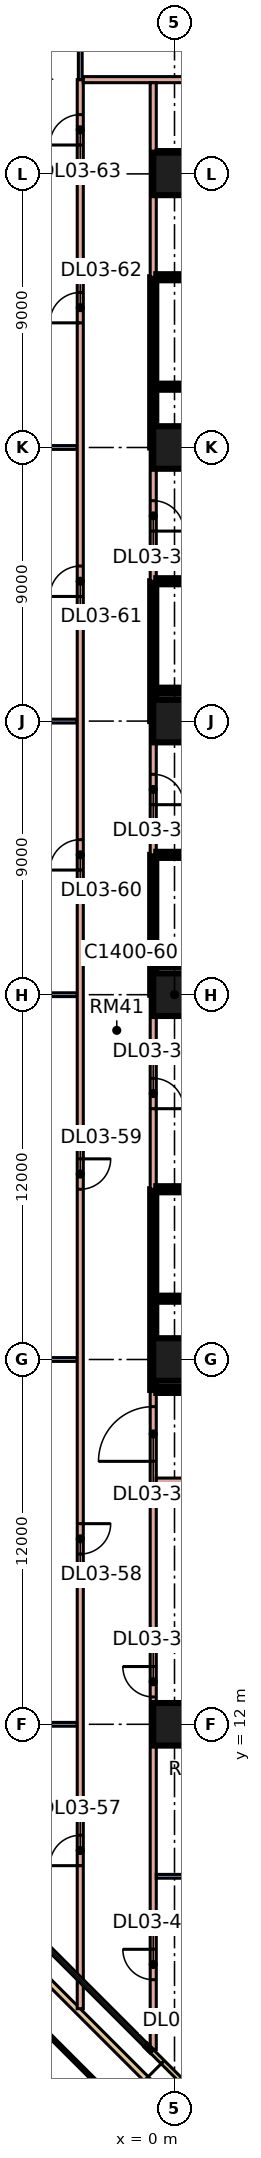
"""IFC4 building model, lengths in metres.
Left out: names, types, materials, properties, quantities, classifications, styles, units other than length and angle.
Written with IfcOpenShell. Run it as: python <this file> out.ifc"""

import sys

from ifc_helpers import new_model, si_unit, direction, frame, frame_2d, origin, origin_2d, place, context, subcontext, project, spatial, rectangle, extrude, element, fill, save


model = new_model("IFC4")
c1 = context("Model", 3, precision=1e-05, world=origin(), true_north=direction((0.0, 1.0)))
c2 = subcontext(c1, "Body", "Model", "MODEL_VIEW")
j1 = project(units=[si_unit("LENGTHUNIT", "METRE"), si_unit("PLANEANGLEUNIT", "RADIAN")], contexts=[c1])
p1 = place(None, origin())
s1 = spatial("IfcSite", under=j1, at=p1, CompositionType="ELEMENT")
p2 = place(p1, origin())
s2 = spatial("IfcBuilding", under=s1, at=p2, CompositionType="ELEMENT")
p3 = place(p2, frame((0.0, 0.0, 16.8)))
s3 = spatial("IfcBuildingStorey", under=s2, at=p3, CompositionType="ELEMENT", Elevation=16.8)
for number, where, z_axis, x_axis in (
    (1, (0.0, 12.0, 0.0), (0.0, 0.0, 1.0), (1.0, 0.0, 0.0)),
    (2, (0.0, 24.0, 0.0), (0.0, 0.0, 1.0), (1.0, 0.0, 0.0)),
    (3, (0.0, 36.0, 0.0), (0.0, 0.0, 1.0), (1.0, 0.0, 0.0)),
    (4, (0.0, 45.0, 0.0), (0.0, 0.0, 1.0), (1.0, 0.0, 0.0)),
    (5, (0.0, 54.0, 0.0), (0.0, 0.0, 1.0), (1.0, 0.0, 0.0)),
    (6, (0.0, 63.0, 0.0), (0.0, 0.0, 1.0), (1.0, 0.0, 0.0)),
):
    element("IfcColumn", number, at=place(p3, frame(where, z_axis=z_axis, x_axis=x_axis)), inside=s3, PredefinedType="COLUMN", context=c2, shape_type="SweptSolid", body=[
        extrude(rectangle(XDim=1.4, YDim=1.4, at=origin_2d()), origin(), (0.0, 0.0, 1.0), 4.8),
    ])
p4 = place(p3, frame((-0.811, 1.31, 0.0), z_axis=(0.0, 0.0, 1.0), x_axis=(0.707106781187, -0.707106781187, 0.0)))
e7 = element("IfcWall", 7, at=p4, inside=s3, PredefinedType="SOLIDWALL", context=c2, shape_type="SweptSolid", body=[
    extrude(rectangle(XDim=3.0, YDim=0.15, at=frame_2d((1.5, 0.0))), origin(), (0.0, 0.0, 1.0), 4.4),
])
p5 = place(p4, frame((0.6, 0.0, 0.0)))
e8 = element("IfcOpeningElement", 8, at=p5, cuts=e7, PredefinedType="OPENING", context=c2, shape_type="SweptSolid", body=[
    extrude(rectangle(XDim=1.8, YDim=2.4, at=frame_2d((0.9, 1.2))), frame((0.0, 0.085, 0.0), z_axis=(0.0, -1.0, 0.0), x_axis=(1.0, 0.0, 0.0)), (0.0, 0.0, 1.0), 0.17),
])
p6 = place(p3, frame((9.104, -9.7, 0.0), z_axis=(0.0, 0.0, 1.0), x_axis=(-0.707106781187, 0.707106781187, 0.0)))
e9 = element("IfcWall", 9, at=p6, inside=s3, PredefinedType="PARAPET", context=c2, shape_type="SweptSolid", body=[
    extrude(rectangle(XDim=26.592, YDim=0.2, at=frame_2d((13.296, 0.0))), origin(), (0.0, 0.0, 1.0), 0.5),
])
p7 = place(p3, frame((-9.7, 64.896, 0.0), z_axis=(0.0, 0.0, 1.0), x_axis=(0.707106781187, 0.707106781187, 0.0)))
e10 = element("IfcWall", 10, at=p7, inside=s3, PredefinedType="PARAPET", context=c2, shape_type="SweptSolid", body=[
    extrude(rectangle(XDim=11.036, YDim=0.2, at=frame_2d((5.518, 0.0))), origin(), (0.0, 0.0, 1.0), 0.5),
])
for number, where, z_axis, x_axis in (
    (11, (-9.6, 12.0, 0.0), (0.0, 0.0, 1.0), (1.0, 0.0, 0.0)),
    (12, (-9.6, 45.0, 0.0), (0.0, 0.0, 1.0), (1.0, 0.0, 0.0)),
    (13, (-9.6, 54.0, 0.0), (0.0, 0.0, 1.0), (1.0, 0.0, 0.0)),
    (14, (-9.6, 63.0, 0.0), (0.0, 0.0, 1.0), (1.0, 0.0, 0.0)),
):
    element("IfcWall", number, at=place(p3, frame(where, z_axis=z_axis, x_axis=x_axis)), inside=s3, PredefinedType="PARTITIONING", context=c2, shape_type="SweptSolid", body=[
        extrude(rectangle(XDim=6.4, YDim=0.125, at=frame_2d((3.2, 0.0))), origin(), (0.0, 0.0, 1.0), 4.4),
    ])
for number, where, z_axis, x_axis in (
    (15, (-8.851, 24.0, 0.0), (0.0, 0.0, 1.0), (1.0, 0.0, 0.0)),
    (16, (-8.851, 36.0, 0.0), (0.0, 0.0, 1.0), (1.0, 0.0, 0.0)),
):
    element("IfcWall", number, at=place(p3, frame(where, z_axis=z_axis, x_axis=x_axis)), inside=s3, PredefinedType="PARTITIONING", context=c2, shape_type="SweptSolid", body=[
        extrude(rectangle(XDim=5.651, YDim=0.125, at=frame_2d((2.826, 0.0))), origin(), (0.0, 0.0, 1.0), 4.4),
    ])
p8 = place(p3, frame((-3.1, 2.645, 0.0), z_axis=(0.0, 0.0, 1.0), x_axis=(0.0, 1.0, 0.0)))
e17 = element("IfcWall", 17, at=p8, inside=s3, PredefinedType="PARTITIONING", context=c2, shape_type="SweptSolid", body=[
    extrude(rectangle(XDim=63.455, YDim=0.2, at=frame_2d((31.728, 0.0))), origin(), (0.0, 0.0, 1.0), 4.4),
])
p9 = place(p8, frame((4.705, 0.0, 0.0)))
e18 = element("IfcOpeningElement", 18, at=p9, cuts=e17, PredefinedType="OPENING", context=c2, shape_type="SweptSolid", body=[
    extrude(rectangle(XDim=1.0, YDim=2.1, at=frame_2d((0.5, 1.05))), frame((0.0, 0.11, 0.0), z_axis=(0.0, -1.0, 0.0), x_axis=(1.0, 0.0, 0.0)), (0.0, 0.0, 1.0), 0.22),
])
p10 = place(p8, frame((14.955, 0.0, 0.0)))
e19 = element("IfcOpeningElement", 19, at=p10, cuts=e17, PredefinedType="OPENING", context=c2, shape_type="SweptSolid", body=[
    extrude(rectangle(XDim=1.0, YDim=2.1, at=frame_2d((0.5, 1.05))), frame((0.0, 0.11, 0.0), z_axis=(0.0, -1.0, 0.0), x_axis=(1.0, 0.0, 0.0)), (0.0, 0.0, 1.0), 0.22),
])
p11 = place(p8, frame((26.955, 0.0, 0.0)))
e20 = element("IfcOpeningElement", 20, at=p11, cuts=e17, PredefinedType="OPENING", context=c2, shape_type="SweptSolid", body=[
    extrude(rectangle(XDim=1.0, YDim=2.1, at=frame_2d((0.5, 1.05))), frame((0.0, 0.11, 0.0), z_axis=(0.0, -1.0, 0.0), x_axis=(1.0, 0.0, 0.0)), (0.0, 0.0, 1.0), 0.22),
])
p12 = place(p8, frame((37.455, 0.0, 0.0)))
e21 = element("IfcOpeningElement", 21, at=p12, cuts=e17, PredefinedType="OPENING", context=c2, shape_type="SweptSolid", body=[
    extrude(rectangle(XDim=1.0, YDim=2.1, at=frame_2d((0.5, 1.05))), frame((0.0, 0.11, 0.0), z_axis=(0.0, -1.0, 0.0), x_axis=(1.0, 0.0, 0.0)), (0.0, 0.0, 1.0), 0.22),
])
p13 = place(p8, frame((46.455, 0.0, 0.0)))
e22 = element("IfcOpeningElement", 22, at=p13, cuts=e17, PredefinedType="OPENING", context=c2, shape_type="SweptSolid", body=[
    extrude(rectangle(XDim=1.0, YDim=2.1, at=frame_2d((0.5, 1.05))), frame((0.0, 0.11, 0.0), z_axis=(0.0, -1.0, 0.0), x_axis=(1.0, 0.0, 0.0)), (0.0, 0.0, 1.0), 0.22),
])
p14 = place(p8, frame((55.455, 0.0, 0.0)))
e23 = element("IfcOpeningElement", 23, at=p14, cuts=e17, PredefinedType="OPENING", context=c2, shape_type="SweptSolid", body=[
    extrude(rectangle(XDim=1.0, YDim=2.1, at=frame_2d((0.5, 1.05))), frame((0.0, 0.11, 0.0), z_axis=(0.0, -1.0, 0.0), x_axis=(1.0, 0.0, 0.0)), (0.0, 0.0, 1.0), 0.22),
])
p15 = place(p8, frame((61.305, 0.0, 0.0)))
e24 = element("IfcOpeningElement", 24, at=p15, cuts=e17, PredefinedType="OPENING", context=c2, shape_type="SweptSolid", body=[
    extrude(rectangle(XDim=1.0, YDim=2.1, at=frame_2d((0.5, 1.05))), frame((0.0, 0.11, 0.0), z_axis=(0.0, -1.0, 0.0), x_axis=(1.0, 0.0, 0.0)), (0.0, 0.0, 1.0), 0.22),
])
p16 = place(p3, frame((-3.1, 66.1, 0.0), z_axis=(0.0, 0.0, 1.0), x_axis=(0.0, 1.0, 0.0)))
e25 = element("IfcWall", 25, at=p16, inside=s3, PredefinedType="PARTITIONING", context=c2, shape_type="SweptSolid", body=[
    extrude(rectangle(XDim=5.255, YDim=0.125, at=frame_2d((2.627, 0.0))), origin(), (0.0, 0.0, 1.0), 4.4),
])
p17 = place(p3, frame((-3.0, 66.1, 0.0), z_axis=(0.0, 0.0, 1.0), x_axis=(1.0, 0.0, 0.0)))
e26 = element("IfcWall", 26, at=p17, inside=s3, PredefinedType="PARTITIONING", context=c2, shape_type="SweptSolid", body=[
    extrude(rectangle(XDim=30.0, YDim=0.2, at=frame_2d((15.0, 0.0))), origin(), (0.0, 0.0, 1.0), 4.4),
])
p18 = place(p17, frame((8.6, 0.0, 0.0)))
e27 = element("IfcOpeningElement", 27, at=p18, cuts=e26, PredefinedType="OPENING", context=c2, shape_type="SweptSolid", body=[
    extrude(rectangle(XDim=1.0, YDim=2.1, at=frame_2d((0.5, 1.05))), frame((0.0, 0.11, 0.0), z_axis=(0.0, -1.0, 0.0), x_axis=(1.0, 0.0, 0.0)), (0.0, 0.0, 1.0), 0.22),
])
p19 = place(p17, frame((22.35, 0.0, 0.0)))
e28 = element("IfcOpeningElement", 28, at=p19, cuts=e26, PredefinedType="OPENING", context=c2, shape_type="SweptSolid", body=[
    extrude(rectangle(XDim=1.0, YDim=2.1, at=frame_2d((0.5, 1.05))), frame((0.0, 0.11, 0.0), z_axis=(0.0, -1.0, 0.0), x_axis=(1.0, 0.0, 0.0)), (0.0, 0.0, 1.0), 0.22),
])
p20 = place(p3, frame((-0.7, 1.304, 0.0), z_axis=(0.0, 0.0, 1.0), x_axis=(0.0, 1.0, 0.0)))
e29 = element("IfcWall", 29, at=p20, inside=s3, PredefinedType="PARTITIONING", context=c2, shape_type="SweptSolid", body=[
    extrude(rectangle(XDim=21.696, YDim=0.2, at=frame_2d((10.848, 0.0))), origin(), (0.0, 0.0, 1.0), 4.4),
])
p21 = place(p20, frame((19.346, 0.0, 0.0)))
e30 = element("IfcOpeningElement", 30, at=p21, cuts=e29, PredefinedType="OPENING", context=c2, shape_type="SweptSolid", body=[
    extrude(rectangle(XDim=1.8, YDim=2.1, at=frame_2d((0.9, 1.05))), frame((0.0, 0.11, 0.0), z_axis=(0.0, -1.0, 0.0), x_axis=(1.0, 0.0, 0.0)), (0.0, 0.0, 1.0), 0.22),
])
p22 = place(p20, frame((11.596, 0.0, 0.0)))
e31 = element("IfcOpeningElement", 31, at=p22, cuts=e29, PredefinedType="OPENING", context=c2, shape_type="SweptSolid", body=[
    extrude(rectangle(XDim=1.0, YDim=2.1, at=frame_2d((0.5, 1.05))), frame((0.0, 0.11, 0.0), z_axis=(0.0, -1.0, 0.0), x_axis=(1.0, 0.0, 0.0)), (0.0, 0.0, 1.0), 0.22),
])
p23 = place(p20, frame((2.295, 0.0, 0.0)))
e32 = element("IfcOpeningElement", 32, at=p23, cuts=e29, PredefinedType="OPENING", context=c2, shape_type="SweptSolid", body=[
    extrude(rectangle(XDim=1.0, YDim=2.1, at=frame_2d((0.5, 1.05))), frame((0.0, 0.11, 0.0), z_axis=(0.0, -1.0, 0.0), x_axis=(1.0, 0.0, 0.0)), (0.0, 0.0, 1.0), 0.22),
])
p24 = place(p3, frame((-0.7, 23.0, 0.0), z_axis=(0.0, 0.0, 1.0), x_axis=(0.0, 1.0, 0.0)))
e33 = element("IfcWall", 33, at=p24, inside=s3, PredefinedType="SOLIDWALL", context=c2, shape_type="SweptSolid", body=[
    extrude(rectangle(XDim=6.6, YDim=0.2, at=frame_2d((3.3, 0.0))), origin(), (0.0, 0.0, 1.0), 4.4),
])
p25 = place(p3, frame((-0.7, 29.6, 0.0), z_axis=(0.0, 0.0, 1.0), x_axis=(0.0, 1.0, 0.0)))
e34 = element("IfcWall", 34, at=p25, inside=s3, PredefinedType="PARTITIONING", context=c2, shape_type="SweptSolid", body=[
    extrude(rectangle(XDim=6.4, YDim=0.2, at=frame_2d((3.2, 0.0))), origin(), (0.0, 0.0, 1.0), 4.4),
])
p26 = place(p25, frame((2.65, 0.0, 0.0)))
e35 = element("IfcOpeningElement", 35, at=p26, cuts=e34, PredefinedType="OPENING", context=c2, shape_type="SweptSolid", body=[
    extrude(rectangle(XDim=1.0, YDim=2.1, at=frame_2d((0.5, 1.05))), frame((0.0, 0.11, 0.0), z_axis=(0.0, -1.0, 0.0), x_axis=(1.0, 0.0, 0.0)), (0.0, 0.0, 1.0), 0.22),
])
p27 = place(p3, frame((-0.7, 36.0, 0.0), z_axis=(0.0, 0.0, 1.0), x_axis=(0.0, 1.0, 0.0)))
e36 = element("IfcWall", 36, at=p27, inside=s3, PredefinedType="SOLIDWALL", context=c2, shape_type="SweptSolid", body=[
    extrude(rectangle(XDim=4.6, YDim=0.2, at=frame_2d((2.3, 0.0))), origin(), (0.0, 0.0, 1.0), 4.4),
])
p28 = place(p3, frame((-0.7, 40.6, 0.0), z_axis=(0.0, 0.0, 1.0), x_axis=(0.0, 1.0, 0.0)))
e37 = element("IfcWall", 37, at=p28, inside=s3, PredefinedType="PARTITIONING", context=c2, shape_type="SweptSolid", body=[
    extrude(rectangle(XDim=4.4, YDim=0.2, at=frame_2d((2.2, 0.0))), origin(), (0.0, 0.0, 1.0), 4.4),
])
p29 = place(p28, frame((1.65, 0.0, 0.0)))
e38 = element("IfcOpeningElement", 38, at=p29, cuts=e37, PredefinedType="OPENING", context=c2, shape_type="SweptSolid", body=[
    extrude(rectangle(XDim=1.0, YDim=2.1, at=frame_2d((0.5, 1.05))), frame((0.0, 0.11, 0.0), z_axis=(0.0, -1.0, 0.0), x_axis=(1.0, 0.0, 0.0)), (0.0, 0.0, 1.0), 0.22),
])
p30 = place(p3, frame((-0.7, 45.0, 0.0), z_axis=(0.0, 0.0, 1.0), x_axis=(0.0, 1.0, 0.0)))
e39 = element("IfcWall", 39, at=p30, inside=s3, PredefinedType="SOLIDWALL", context=c2, shape_type="SweptSolid", body=[
    extrude(rectangle(XDim=4.6, YDim=0.2, at=frame_2d((2.3, 0.0))), origin(), (0.0, 0.0, 1.0), 4.4),
])
p31 = place(p3, frame((-0.7, 49.6, 0.0), z_axis=(0.0, 0.0, 1.0), x_axis=(0.0, 1.0, 0.0)))
e40 = element("IfcWall", 40, at=p31, inside=s3, PredefinedType="PARTITIONING", context=c2, shape_type="SweptSolid", body=[
    extrude(rectangle(XDim=4.4, YDim=0.2, at=frame_2d((2.2, 0.0))), origin(), (0.0, 0.0, 1.0), 4.4),
])
p32 = place(p31, frame((1.65, 0.0, 0.0)))
e41 = element("IfcOpeningElement", 41, at=p32, cuts=e40, PredefinedType="OPENING", context=c2, shape_type="SweptSolid", body=[
    extrude(rectangle(XDim=1.0, YDim=2.1, at=frame_2d((0.5, 1.05))), frame((0.0, 0.11, 0.0), z_axis=(0.0, -1.0, 0.0), x_axis=(1.0, 0.0, 0.0)), (0.0, 0.0, 1.0), 0.22),
])
p33 = place(p3, frame((-0.7, 54.0, 0.0), z_axis=(0.0, 0.0, 1.0), x_axis=(0.0, 1.0, 0.0)))
e42 = element("IfcWall", 42, at=p33, inside=s3, PredefinedType="SOLIDWALL", context=c2, shape_type="SweptSolid", body=[
    extrude(rectangle(XDim=5.6, YDim=0.2, at=frame_2d((2.8, 0.0))), origin(), (0.0, 0.0, 1.0), 4.4),
])
p34 = place(p3, frame((-0.7, 59.6, 0.0), z_axis=(0.0, 0.0, 1.0), x_axis=(0.0, 1.0, 0.0)))
e43 = element("IfcWall", 43, at=p34, inside=s3, PredefinedType="PARTITIONING", context=c2, shape_type="SweptSolid", body=[
    extrude(rectangle(XDim=6.4, YDim=0.2, at=frame_2d((3.2, 0.0))), origin(), (0.0, 0.0, 1.0), 4.4),
])
p35 = place(p3, frame((-0.6, 7.0, 0.0), z_axis=(0.0, 0.0, 1.0), x_axis=(1.0, 0.0, 0.0)))
e44 = element("IfcWall", 44, at=p35, inside=s3, PredefinedType="PARTITIONING", context=c2, shape_type="SweptSolid", body=[
    extrude(rectangle(XDim=2.638, YDim=0.125, at=frame_2d((1.319, 0.0))), origin(), (0.0, 0.0, 1.0), 4.4),
])
p36 = place(p3, frame((-0.6, 20.0, 0.0), z_axis=(0.0, 0.0, 1.0), x_axis=(1.0, 0.0, 0.0)))
e45 = element("IfcWall", 45, at=p36, inside=s3, PredefinedType="PARTITIONING", context=c2, shape_type="SweptSolid", body=[
    extrude(rectangle(XDim=2.7, YDim=0.2, at=frame_2d((1.35, 0.0))), origin(), (0.0, 0.0, 1.0), 4.4),
])
p37 = place(p3, frame((-0.6, 23.0, 0.0), z_axis=(0.0, 0.0, 1.0), x_axis=(1.0, 0.0, 0.0)))
e46 = element("IfcWall", 46, at=p37, inside=s3, PredefinedType="SOLIDWALL", context=c2, shape_type="SweptSolid", body=[
    extrude(rectangle(XDim=13.3, YDim=0.2, at=frame_2d((6.65, 0.0))), origin(), (0.0, 0.0, 1.0), 4.4),
])
p38 = place(p37, frame((10.6, 0.0, 0.0)))
e47 = element("IfcOpeningElement", 47, at=p38, cuts=e46, PredefinedType="OPENING", context=c2, shape_type="SweptSolid", body=[
    extrude(rectangle(XDim=1.2, YDim=2.1, at=frame_2d((0.6, 1.05))), frame((0.0, 0.11, 0.0), z_axis=(0.0, -1.0, 0.0), x_axis=(1.0, 0.0, 0.0)), (0.0, 0.0, 1.0), 0.22),
])
for number, where, z_axis, x_axis in (
    (48, (-0.6, 29.6, 0.0), (0.0, 0.0, 1.0), (1.0, 0.0, 0.0)),
    (49, (-0.6, 36.0, 0.0), (0.0, 0.0, 1.0), (1.0, 0.0, 0.0)),
    (50, (-0.6, 40.6, 0.0), (0.0, 0.0, 1.0), (1.0, 0.0, 0.0)),
    (51, (-0.6, 45.0, 0.0), (0.0, 0.0, 1.0), (1.0, 0.0, 0.0)),
    (52, (-0.6, 49.6, 0.0), (0.0, 0.0, 1.0), (1.0, 0.0, 0.0)),
    (53, (-0.6, 54.0, 0.0), (0.0, 0.0, 1.0), (1.0, 0.0, 0.0)),
    (54, (-0.6, 59.6, 0.0), (0.0, 0.0, 1.0), (1.0, 0.0, 0.0)),
):
    element("IfcWall", number, at=place(p3, frame(where, z_axis=z_axis, x_axis=x_axis)), inside=s3, PredefinedType="SOLIDWALL", context=c2, shape_type="SweptSolid", body=[
        extrude(rectangle(XDim=13.1, YDim=0.2, at=frame_2d((6.55, 0.0))), origin(), (0.0, 0.0, 1.0), 4.4),
    ])
p39 = place(p3, frame((-0.6, 63.7, 0.0), z_axis=(0.0, 0.0, 1.0), x_axis=(1.0, 0.0, 0.0)))
e55 = element("IfcWall", 55, at=p39, inside=s3, PredefinedType="PARTITIONING", context=c2, shape_type="SweptSolid", body=[
    extrude(rectangle(XDim=13.3, YDim=0.2, at=frame_2d((6.65, 0.0))), origin(), (0.0, 0.0, 1.0), 4.4),
])
p40 = place(p39, frame((6.05, 0.0, 0.0)))
e56 = element("IfcOpeningElement", 56, at=p40, cuts=e55, PredefinedType="OPENING", context=c2, shape_type="SweptSolid", body=[
    extrude(rectangle(XDim=1.0, YDim=2.1, at=frame_2d((0.5, 1.05))), frame((0.0, 0.11, 0.0), z_axis=(0.0, -1.0, 0.0), x_axis=(1.0, 0.0, 0.0)), (0.0, 0.0, 1.0), 0.22),
])
for number, where, z_axis, x_axis in (
    (57, (-0.6, 56.0, 0.0), (0.0, 0.0, 1.0), (1.0, 0.0, 0.0)),
    (58, (-0.6, 46.0, 0.0), (0.0, 0.0, 1.0), (1.0, 0.0, 0.0)),
    (59, (-0.6, 26.0, 0.0), (0.0, 0.0, 1.0), (1.0, 0.0, 0.0)),
    (60, (-0.6, 37.0, 0.0), (0.0, 0.0, 1.0), (1.0, 0.0, 0.0)),
):
    element("IfcWall", number, at=place(p3, frame(where, z_axis=z_axis, x_axis=x_axis)), inside=s3, PredefinedType="SOLIDWALL", context=c2, shape_type="SweptSolid", body=[
        extrude(rectangle(XDim=7.945, YDim=0.2, at=frame_2d((3.973, 0.0))), origin(), (0.0, 0.0, 1.0), 4.4),
    ])
p41 = place(p5, frame((1.8, 0.0, 0.0), z_axis=(0.0, 0.0, 1.0), x_axis=(-1.0, 0.0, 0.0)))
e61 = element("IfcDoor", 61, at=p41, inside=s3, OperationType="DOUBLE_DOOR_SINGLE_SWING", PredefinedType="DOOR", context=c2, shape_type="SweptSolid", body=[
    extrude(rectangle(XDim=1.8, YDim=2.4, at=frame_2d((0.9, 1.2))), frame((0.0, 0.025, 0.0), z_axis=(0.0, -1.0, 0.0), x_axis=(1.0, 0.0, 0.0)), (0.0, 0.0, 1.0), 0.05),
])
fill(e8, e61)
p42 = place(p26, frame((1.0, 0.0, 0.0), z_axis=(0.0, 0.0, 1.0), x_axis=(-1.0, 0.0, 0.0)))
e62 = element("IfcDoor", 62, at=p42, inside=s3, OperationType="SINGLE_SWING_LEFT", PredefinedType="DOOR", context=c2, shape_type="SweptSolid", body=[
    extrude(rectangle(XDim=1.0, YDim=2.1, at=frame_2d((0.5, 1.05))), frame((0.0, 0.025, 0.0), z_axis=(0.0, -1.0, 0.0), x_axis=(1.0, 0.0, 0.0)), (0.0, 0.0, 1.0), 0.05),
])
fill(e35, e62)
p43 = place(p29, frame((1.0, 0.0, 0.0), z_axis=(0.0, 0.0, 1.0), x_axis=(-1.0, 0.0, 0.0)))
e63 = element("IfcDoor", 63, at=p43, inside=s3, OperationType="SINGLE_SWING_LEFT", PredefinedType="DOOR", context=c2, shape_type="SweptSolid", body=[
    extrude(rectangle(XDim=1.0, YDim=2.1, at=frame_2d((0.5, 1.05))), frame((0.0, 0.025, 0.0), z_axis=(0.0, -1.0, 0.0), x_axis=(1.0, 0.0, 0.0)), (0.0, 0.0, 1.0), 0.05),
])
fill(e38, e63)
p44 = place(p32, frame((1.0, 0.0, 0.0), z_axis=(0.0, 0.0, 1.0), x_axis=(-1.0, 0.0, 0.0)))
e64 = element("IfcDoor", 64, at=p44, inside=s3, OperationType="SINGLE_SWING_LEFT", PredefinedType="DOOR", context=c2, shape_type="SweptSolid", body=[
    extrude(rectangle(XDim=1.0, YDim=2.1, at=frame_2d((0.5, 1.05))), frame((0.0, 0.025, 0.0), z_axis=(0.0, -1.0, 0.0), x_axis=(1.0, 0.0, 0.0)), (0.0, 0.0, 1.0), 0.05),
])
fill(e41, e64)
p45 = place(p21, origin())
e65 = element("IfcDoor", 65, at=p45, inside=s3, OperationType="DOUBLE_DOOR_SINGLE_SWING", PredefinedType="DOOR", context=c2, shape_type="SweptSolid", body=[
    extrude(rectangle(XDim=1.8, YDim=2.1, at=frame_2d((0.9, 1.05))), frame((0.0, 0.025, 0.0), z_axis=(0.0, -1.0, 0.0), x_axis=(1.0, 0.0, 0.0)), (0.0, 0.0, 1.0), 0.05),
])
fill(e30, e65)
p46 = place(p22, frame((1.0, 0.0, 0.0), z_axis=(0.0, 0.0, 1.0), x_axis=(-1.0, 0.0, 0.0)))
e66 = element("IfcDoor", 66, at=p46, inside=s3, OperationType="SINGLE_SWING_RIGHT", PredefinedType="DOOR", context=c2, shape_type="SweptSolid", body=[
    extrude(rectangle(XDim=1.0, YDim=2.1, at=frame_2d((0.5, 1.05))), frame((0.0, 0.025, 0.0), z_axis=(0.0, -1.0, 0.0), x_axis=(1.0, 0.0, 0.0)), (0.0, 0.0, 1.0), 0.05),
])
fill(e31, e66)
p47 = place(p23, frame((1.0, 0.0, 0.0), z_axis=(0.0, 0.0, 1.0), x_axis=(-1.0, 0.0, 0.0)))
e67 = element("IfcDoor", 67, at=p47, inside=s3, OperationType="SINGLE_SWING_RIGHT", PredefinedType="DOOR", context=c2, shape_type="SweptSolid", body=[
    extrude(rectangle(XDim=1.0, YDim=2.1, at=frame_2d((0.5, 1.05))), frame((0.0, 0.025, 0.0), z_axis=(0.0, -1.0, 0.0), x_axis=(1.0, 0.0, 0.0)), (0.0, 0.0, 1.0), 0.05),
])
fill(e32, e67)
p48 = place(p9, origin())
e68 = element("IfcDoor", 68, at=p48, inside=s3, OperationType="SINGLE_SWING_LEFT", PredefinedType="DOOR", context=c2, shape_type="SweptSolid", body=[
    extrude(rectangle(XDim=1.0, YDim=2.1, at=frame_2d((0.5, 1.05))), frame((0.0, 0.025, 0.0), z_axis=(0.0, -1.0, 0.0), x_axis=(1.0, 0.0, 0.0)), (0.0, 0.0, 1.0), 0.05),
])
fill(e18, e68)
p49 = place(p10, origin())
e69 = element("IfcDoor", 69, at=p49, inside=s3, OperationType="SINGLE_SWING_RIGHT", PredefinedType="DOOR", context=c2, shape_type="SweptSolid", body=[
    extrude(rectangle(XDim=1.0, YDim=2.1, at=frame_2d((0.5, 1.05))), frame((0.0, 0.025, 0.0), z_axis=(0.0, -1.0, 0.0), x_axis=(1.0, 0.0, 0.0)), (0.0, 0.0, 1.0), 0.05),
])
fill(e19, e69)
p50 = place(p11, origin())
e70 = element("IfcDoor", 70, at=p50, inside=s3, OperationType="SINGLE_SWING_RIGHT", PredefinedType="DOOR", context=c2, shape_type="SweptSolid", body=[
    extrude(rectangle(XDim=1.0, YDim=2.1, at=frame_2d((0.5, 1.05))), frame((0.0, 0.025, 0.0), z_axis=(0.0, -1.0, 0.0), x_axis=(1.0, 0.0, 0.0)), (0.0, 0.0, 1.0), 0.05),
])
fill(e20, e70)
p51 = place(p12, origin())
e71 = element("IfcDoor", 71, at=p51, inside=s3, OperationType="SINGLE_SWING_LEFT", PredefinedType="DOOR", context=c2, shape_type="SweptSolid", body=[
    extrude(rectangle(XDim=1.0, YDim=2.1, at=frame_2d((0.5, 1.05))), frame((0.0, 0.025, 0.0), z_axis=(0.0, -1.0, 0.0), x_axis=(1.0, 0.0, 0.0)), (0.0, 0.0, 1.0), 0.05),
])
fill(e21, e71)
p52 = place(p13, origin())
e72 = element("IfcDoor", 72, at=p52, inside=s3, OperationType="SINGLE_SWING_LEFT", PredefinedType="DOOR", context=c2, shape_type="SweptSolid", body=[
    extrude(rectangle(XDim=1.0, YDim=2.1, at=frame_2d((0.5, 1.05))), frame((0.0, 0.025, 0.0), z_axis=(0.0, -1.0, 0.0), x_axis=(1.0, 0.0, 0.0)), (0.0, 0.0, 1.0), 0.05),
])
fill(e22, e72)
p53 = place(p14, origin())
e73 = element("IfcDoor", 73, at=p53, inside=s3, OperationType="SINGLE_SWING_LEFT", PredefinedType="DOOR", context=c2, shape_type="SweptSolid", body=[
    extrude(rectangle(XDim=1.0, YDim=2.1, at=frame_2d((0.5, 1.05))), frame((0.0, 0.025, 0.0), z_axis=(0.0, -1.0, 0.0), x_axis=(1.0, 0.0, 0.0)), (0.0, 0.0, 1.0), 0.05),
])
fill(e23, e73)
p54 = place(p15, origin())
e74 = element("IfcDoor", 74, at=p54, inside=s3, OperationType="SINGLE_SWING_LEFT", PredefinedType="DOOR", context=c2, shape_type="SweptSolid", body=[
    extrude(rectangle(XDim=1.0, YDim=2.1, at=frame_2d((0.5, 1.05))), frame((0.0, 0.025, 0.0), z_axis=(0.0, -1.0, 0.0), x_axis=(1.0, 0.0, 0.0)), (0.0, 0.0, 1.0), 0.05),
])
fill(e24, e74)
save(model, sys.argv[1])
